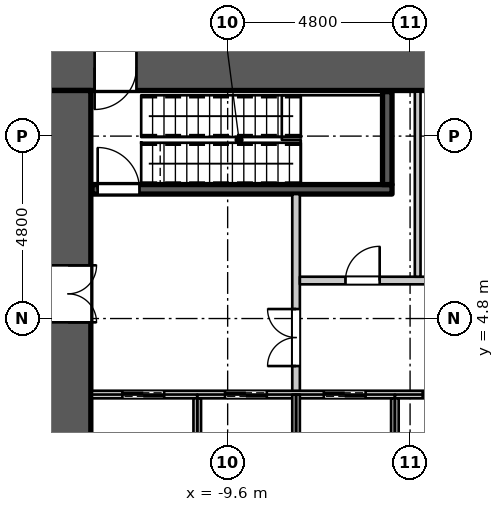
"""IFC4 building model, lengths in metres.
Left out: names, types, materials, properties, quantities, classifications, styles, units other than length and angle.
Written with IfcOpenShell. Run it as: python <this file> out.ifc"""

import sys

from ifc_helpers import new_model, si_unit, direction, frame, frame_2d, origin, place, context, subcontext, project, spatial, rectangle, extrude, element, fill, save


model = new_model("IFC4")
c1 = context("Model", 3, precision=1e-05, world=origin(), true_north=direction((0.0, 1.0)))
c2 = subcontext(c1, "Body", "Model", "MODEL_VIEW")
j1 = project(units=[si_unit("LENGTHUNIT", "METRE"), si_unit("PLANEANGLEUNIT", "RADIAN")], contexts=[c1])
p1 = place(None, origin())
s1 = spatial("IfcSite", under=j1, at=p1, CompositionType="ELEMENT")
p2 = place(p1, origin())
s2 = spatial("IfcBuilding", under=s1, at=p2, CompositionType="ELEMENT")
p3 = place(p2, frame((0.0, 0.0, 11.0)))
s3 = spatial("IfcBuildingStorey", under=s2, at=p3, CompositionType="ELEMENT", Elevation=11.0)
p4 = place(p3, frame((-14.4, 11.4, 0.0), z_axis=(0.0, 0.0, 1.0), x_axis=(1.0, 0.0, 0.0)))
e1 = element("IfcWall", 1, at=p4, inside=s3, PredefinedType="SHEAR", context=c2, shape_type="SweptSolid", body=[
    extrude(rectangle(XDim=28.8, YDim=1.2, at=frame_2d((14.4, 0.0))), origin(), (0.0, 0.0, 1.0), 5.0),
])
p5 = place(p4, frame((1.3, 0.0, 0.0)))
e2 = element("IfcOpeningElement", 2, at=p5, cuts=e1, PredefinedType="OPENING", context=c2, shape_type="SweptSolid", body=[
    extrude(rectangle(XDim=1.1, YDim=2.2, at=frame_2d((0.55, 1.1))), frame((0.0, 0.61, 0.0), z_axis=(0.0, -1.0, 0.0), x_axis=(1.0, 0.0, 0.0)), (0.0, 0.0, 1.0), 1.22),
])
p6 = place(p4, frame((26.4, 0.0, 0.0)))
e3 = element("IfcOpeningElement", 3, at=p6, cuts=e1, PredefinedType="OPENING", context=c2, shape_type="SweptSolid", body=[
    extrude(rectangle(XDim=1.1, YDim=2.2, at=frame_2d((0.55, 1.1))), frame((0.0, 0.61, 0.0), z_axis=(0.0, -1.0, 0.0), x_axis=(1.0, 0.0, 0.0)), (0.0, 0.0, 1.0), 1.22),
])
p7 = place(p3, frame((-13.8, -10.8, 0.0), z_axis=(0.0, 0.0, 1.0), x_axis=(0.0, 1.0, 0.0)))
e4 = element("IfcWall", 4, at=p7, inside=s3, PredefinedType="SHEAR", context=c2, shape_type="SweptSolid", body=[
    extrude(rectangle(XDim=21.6, YDim=1.2, at=frame_2d((10.8, 0.0))), origin(), (0.0, 0.0, 1.0), 5.0),
])
p8 = place(p7, frame((15.5, 0.0, 0.0)))
e5 = element("IfcOpeningElement", 5, at=p8, cuts=e4, PredefinedType="OPENING", context=c2, shape_type="SweptSolid", body=[
    extrude(rectangle(XDim=1.5, YDim=2.4, at=frame_2d((0.75, 1.2))), frame((0.0, 0.61, 0.0), z_axis=(0.0, -1.0, 0.0), x_axis=(1.0, 0.0, 0.0)), (0.0, 0.0, 1.0), 1.22),
])
p9 = place(p7, frame((4.5, 0.0, 0.0)))
e6 = element("IfcOpeningElement", 6, at=p9, cuts=e4, PredefinedType="OPENING", context=c2, shape_type="SweptSolid", body=[
    extrude(rectangle(XDim=1.5, YDim=2.4, at=frame_2d((0.75, 1.2))), frame((0.0, 0.61, 0.0), z_axis=(0.0, -1.0, 0.0), x_axis=(1.0, 0.0, 0.0)), (0.0, 0.0, 1.0), 1.22),
])
p10 = place(p3, frame((-7.8, 2.8, 0.0), z_axis=(0.0, 0.0, 1.0), x_axis=(0.0, 1.0, 0.0)))
e7 = element("IfcWall", 7, at=p10, inside=s3, PredefinedType="PARTITIONING", context=c2, shape_type="SweptSolid", body=[
    extrude(rectangle(XDim=5.275, YDim=0.2, at=frame_2d((2.637, 0.0))), origin(), (0.0, 0.0, 1.0), 4.65),
])
p11 = place(p10, frame((0.75, 0.0, 0.0)))
e8 = element("IfcOpeningElement", 8, at=p11, cuts=e7, PredefinedType="OPENING", context=c2, shape_type="SweptSolid", body=[
    extrude(rectangle(XDim=1.5, YDim=2.4, at=frame_2d((0.75, 1.2))), frame((0.0, 0.11, 0.0), z_axis=(0.0, -1.0, 0.0), x_axis=(1.0, 0.0, 0.0)), (0.0, 0.0, 1.0), 0.22),
])
p12 = place(p3, frame((-7.7, 5.8, 0.0), z_axis=(0.0, 0.0, 1.0), x_axis=(1.0, 0.0, 0.0)))
e9 = element("IfcWall", 9, at=p12, inside=s3, PredefinedType="PARTITIONING", context=c2, shape_type="SweptSolid", body=[
    extrude(rectangle(XDim=11.12, YDim=0.2, at=frame_2d((5.56, 0.0))), origin(), (0.0, 0.0, 1.0), 4.65),
])
p13 = place(p12, frame((1.2, 0.0, 0.0)))
e10 = element("IfcOpeningElement", 10, at=p13, cuts=e9, PredefinedType="OPENING", context=c2, shape_type="SweptSolid", body=[
    extrude(rectangle(XDim=0.9, YDim=2.2, at=frame_2d((0.45, 1.1))), frame((0.0, 0.11, 0.0), z_axis=(0.0, -1.0, 0.0), x_axis=(1.0, 0.0, 0.0)), (0.0, 0.0, 1.0), 0.22),
])
p14 = place(p12, frame((4.55, 0.0, 0.0)))
e11 = element("IfcOpeningElement", 11, at=p14, cuts=e9, PredefinedType="OPENING", context=c2, shape_type="SweptSolid", body=[
    extrude(rectangle(XDim=0.9, YDim=2.2, at=frame_2d((0.45, 1.1))), frame((0.0, 0.11, 0.0), z_axis=(0.0, -1.0, 0.0), x_axis=(1.0, 0.0, 0.0)), (0.0, 0.0, 1.0), 0.22),
])
p15 = place(p12, frame((8.5, 0.0, 0.0)))
e12 = element("IfcOpeningElement", 12, at=p15, cuts=e9, PredefinedType="OPENING", context=c2, shape_type="SweptSolid", body=[
    extrude(rectangle(XDim=0.9, YDim=2.2, at=frame_2d((0.45, 1.1))), frame((0.0, 0.11, 0.0), z_axis=(0.0, -1.0, 0.0), x_axis=(1.0, 0.0, 0.0)), (0.0, 0.0, 1.0), 0.22),
])
p16 = place(p3, frame((-4.6, 5.9, 0.0), z_axis=(0.0, 0.0, 1.0), x_axis=(0.0, 1.0, 0.0)))
e13 = element("IfcWall", 13, at=p16, inside=s3, PredefinedType="PARTITIONING", context=c2, shape_type="SweptSolid", body=[
    extrude(rectangle(XDim=4.87, YDim=0.15, at=frame_2d((2.435, 0.0))), origin(), (0.0, 0.0, 1.0), 4.65),
])
p17 = place(p3, frame((-13.17, 2.8, 0.0), z_axis=(0.0, 0.0, 1.0), x_axis=(1.0, 0.0, 0.0)))
e14 = element("IfcWall", 14, at=p17, inside=s3, PredefinedType="PARTITIONING", context=c2, shape_type="SweptSolid", body=[
    extrude(rectangle(XDim=23.57, YDim=0.2, at=frame_2d((11.785, 0.0))), origin(), (0.0, 0.0, 1.0), 4.65),
])
p18 = place(p17, frame((0.8, 0.0, 0.0)))
e15 = element("IfcOpeningElement", 15, at=p18, cuts=e14, PredefinedType="OPENING", context=c2, shape_type="SweptSolid", body=[
    extrude(rectangle(XDim=1.1, YDim=2.2, at=frame_2d((0.55, 1.1))), frame((0.0, 0.11, 0.0), z_axis=(0.0, -1.0, 0.0), x_axis=(1.0, 0.0, 0.0)), (0.0, 0.0, 1.0), 0.22),
])
p19 = place(p17, frame((3.5, 0.0, 0.0)))
e16 = element("IfcOpeningElement", 16, at=p19, cuts=e14, PredefinedType="OPENING", context=c2, shape_type="SweptSolid", body=[
    extrude(rectangle(XDim=1.1, YDim=2.2, at=frame_2d((0.55, 1.1))), frame((0.0, 0.11, 0.0), z_axis=(0.0, -1.0, 0.0), x_axis=(1.0, 0.0, 0.0)), (0.0, 0.0, 1.0), 0.22),
])
p20 = place(p17, frame((6.1, 0.0, 0.0)))
e17 = element("IfcOpeningElement", 17, at=p20, cuts=e14, PredefinedType="OPENING", context=c2, shape_type="SweptSolid", body=[
    extrude(rectangle(XDim=1.1, YDim=2.2, at=frame_2d((0.55, 1.1))), frame((0.0, 0.11, 0.0), z_axis=(0.0, -1.0, 0.0), x_axis=(1.0, 0.0, 0.0)), (0.0, 0.0, 1.0), 0.22),
])
p21 = place(p17, frame((8.7, 0.0, 0.0)))
e18 = element("IfcOpeningElement", 18, at=p21, cuts=e14, PredefinedType="OPENING", context=c2, shape_type="SweptSolid", body=[
    extrude(rectangle(XDim=1.1, YDim=2.2, at=frame_2d((0.55, 1.1))), frame((0.0, 0.11, 0.0), z_axis=(0.0, -1.0, 0.0), x_axis=(1.0, 0.0, 0.0)), (0.0, 0.0, 1.0), 0.22),
])
p22 = place(p17, frame((11.3, 0.0, 0.0)))
e19 = element("IfcOpeningElement", 19, at=p22, cuts=e14, PredefinedType="OPENING", context=c2, shape_type="SweptSolid", body=[
    extrude(rectangle(XDim=1.1, YDim=2.2, at=frame_2d((0.55, 1.1))), frame((0.0, 0.11, 0.0), z_axis=(0.0, -1.0, 0.0), x_axis=(1.0, 0.0, 0.0)), (0.0, 0.0, 1.0), 0.22),
])
p23 = place(p17, frame((13.9, 0.0, 0.0)))
e20 = element("IfcOpeningElement", 20, at=p23, cuts=e14, PredefinedType="OPENING", context=c2, shape_type="SweptSolid", body=[
    extrude(rectangle(XDim=1.1, YDim=2.2, at=frame_2d((0.55, 1.1))), frame((0.0, 0.11, 0.0), z_axis=(0.0, -1.0, 0.0), x_axis=(1.0, 0.0, 0.0)), (0.0, 0.0, 1.0), 0.22),
])
p24 = place(p17, frame((16.5, 0.0, 0.0)))
e21 = element("IfcOpeningElement", 21, at=p24, cuts=e14, PredefinedType="OPENING", context=c2, shape_type="SweptSolid", body=[
    extrude(rectangle(XDim=1.1, YDim=2.2, at=frame_2d((0.55, 1.1))), frame((0.0, 0.11, 0.0), z_axis=(0.0, -1.0, 0.0), x_axis=(1.0, 0.0, 0.0)), (0.0, 0.0, 1.0), 0.22),
])
p25 = place(p17, frame((19.1, 0.0, 0.0)))
e22 = element("IfcOpeningElement", 22, at=p25, cuts=e14, PredefinedType="OPENING", context=c2, shape_type="SweptSolid", body=[
    extrude(rectangle(XDim=1.1, YDim=2.2, at=frame_2d((0.55, 1.1))), frame((0.0, 0.11, 0.0), z_axis=(0.0, -1.0, 0.0), x_axis=(1.0, 0.0, 0.0)), (0.0, 0.0, 1.0), 0.22),
])
p26 = place(p3, frame((-10.4, 0.0, 0.0), z_axis=(0.0, 0.0, 1.0), x_axis=(0.0, 1.0, 0.0)))
e23 = element("IfcWall", 23, at=p26, inside=s3, PredefinedType="PARTITIONING", context=c2, shape_type="SweptSolid", body=[
    extrude(rectangle(XDim=2.7, YDim=0.2, at=frame_2d((1.35, 0.0))), origin(), (0.0, 0.0, 1.0), 4.65),
])
p27 = place(p3, frame((-7.8, 0.0, 0.0), z_axis=(0.0, 0.0, 1.0), x_axis=(0.0, 1.0, 0.0)))
e24 = element("IfcWall", 24, at=p27, inside=s3, PredefinedType="PARTITIONING", context=c2, shape_type="SweptSolid", body=[
    extrude(rectangle(XDim=2.8, YDim=0.2, at=frame_2d((1.4, 0.0))), origin(), (0.0, 0.0, 1.0), 4.65),
])
p28 = place(p3, frame((-5.2, 0.1, 0.0), z_axis=(0.0, 0.0, 1.0), x_axis=(0.0, 1.0, 0.0)))
e25 = element("IfcWall", 25, at=p28, inside=s3, PredefinedType="PARTITIONING", context=c2, shape_type="SweptSolid", body=[
    extrude(rectangle(XDim=2.6, YDim=0.2, at=frame_2d((1.3, 0.0))), origin(), (0.0, 0.0, 1.0), 4.65),
])
p29 = place(p3, frame((-13.17, 8.2, 0.0), z_axis=(0.0, 0.0, 1.0), x_axis=(1.0, 0.0, 0.0)))
e26 = element("IfcWall", 26, at=p29, inside=s3, PredefinedType="SHEAR", context=c2, shape_type="SweptSolid", body=[
    extrude(rectangle(XDim=7.895, YDim=0.25, at=frame_2d((3.948, 0.0))), origin(), (0.0, 0.0, 1.0), 4.65),
])
p30 = place(p29, frame((0.15, 0.0, 0.0)))
e27 = element("IfcOpeningElement", 27, at=p30, cuts=e26, PredefinedType="OPENING", context=c2, shape_type="SweptSolid", body=[
    extrude(rectangle(XDim=1.1, YDim=2.2, at=frame_2d((0.55, 1.1))), frame((0.0, 0.135, 0.0), z_axis=(0.0, -1.0, 0.0), x_axis=(1.0, 0.0, 0.0)), (0.0, 0.0, 1.0), 0.27),
])
p31 = place(p3, frame((-5.4, 8.325, 0.0), z_axis=(0.0, 0.0, 1.0), x_axis=(0.0, 1.0, 0.0)))
e28 = element("IfcWall", 28, at=p31, inside=s3, PredefinedType="SHEAR", context=c2, shape_type="SweptSolid", body=[
    extrude(rectangle(XDim=2.445, YDim=0.25, at=frame_2d((1.223, 0.0))), origin(), (0.0, 0.0, 1.0), 4.65),
])
p32 = place(p13, origin())
e29 = element("IfcDoor", 29, at=p32, inside=s3, OperationType="SINGLE_SWING_RIGHT", PredefinedType="DOOR", context=c2, shape_type="SweptSolid", body=[
    extrude(rectangle(XDim=0.9, YDim=2.2, at=frame_2d((0.45, 1.1))), frame((0.0, 0.025, 0.0), z_axis=(0.0, -1.0, 0.0), x_axis=(1.0, 0.0, 0.0)), (0.0, 0.0, 1.0), 0.05),
])
fill(e10, e29)
p33 = place(p18, origin())
e30 = element("IfcDoor", 30, at=p33, inside=s3, OperationType="DOUBLE_DOOR_SLIDING", PredefinedType="DOOR", context=c2, shape_type="SweptSolid", body=[
    extrude(rectangle(XDim=1.1, YDim=2.2, at=frame_2d((0.55, 1.1))), frame((0.0, 0.025, 0.0), z_axis=(0.0, -1.0, 0.0), x_axis=(1.0, 0.0, 0.0)), (0.0, 0.0, 1.0), 0.05),
])
fill(e15, e30)
p34 = place(p19, origin())
e31 = element("IfcDoor", 31, at=p34, inside=s3, OperationType="DOUBLE_DOOR_SLIDING", PredefinedType="DOOR", context=c2, shape_type="SweptSolid", body=[
    extrude(rectangle(XDim=1.1, YDim=2.2, at=frame_2d((0.55, 1.1))), frame((0.0, 0.025, 0.0), z_axis=(0.0, -1.0, 0.0), x_axis=(1.0, 0.0, 0.0)), (0.0, 0.0, 1.0), 0.05),
])
fill(e16, e31)
p35 = place(p20, origin())
e32 = element("IfcDoor", 32, at=p35, inside=s3, OperationType="DOUBLE_DOOR_SLIDING", PredefinedType="DOOR", context=c2, shape_type="SweptSolid", body=[
    extrude(rectangle(XDim=1.1, YDim=2.2, at=frame_2d((0.55, 1.1))), frame((0.0, 0.025, 0.0), z_axis=(0.0, -1.0, 0.0), x_axis=(1.0, 0.0, 0.0)), (0.0, 0.0, 1.0), 0.05),
])
fill(e17, e32)
p36 = place(p21, origin())
e33 = element("IfcDoor", 33, at=p36, inside=s3, OperationType="DOUBLE_DOOR_SLIDING", PredefinedType="DOOR", context=c2, shape_type="SweptSolid", body=[
    extrude(rectangle(XDim=1.1, YDim=2.2, at=frame_2d((0.55, 1.1))), frame((0.0, 0.025, 0.0), z_axis=(0.0, -1.0, 0.0), x_axis=(1.0, 0.0, 0.0)), (0.0, 0.0, 1.0), 0.05),
])
fill(e18, e33)
p37 = place(p30, origin())
e34 = element("IfcDoor", 34, at=p37, inside=s3, OperationType="SINGLE_SWING_LEFT", PredefinedType="DOOR", context=c2, shape_type="SweptSolid", body=[
    extrude(rectangle(XDim=1.1, YDim=2.2, at=frame_2d((0.55, 1.1))), frame((0.0, 0.025, 0.0), z_axis=(0.0, -1.0, 0.0), x_axis=(1.0, 0.0, 0.0)), (0.0, 0.0, 1.0), 0.05),
])
fill(e27, e34)
p38 = place(p11, origin())
e35 = element("IfcDoor", 35, at=p38, inside=s3, OperationType="DOUBLE_DOOR_SINGLE_SWING", PredefinedType="DOOR", context=c2, shape_type="SweptSolid", body=[
    extrude(rectangle(XDim=1.5, YDim=2.4, at=frame_2d((0.75, 1.2))), frame((0.0, 0.025, 0.0), z_axis=(0.0, -1.0, 0.0), x_axis=(1.0, 0.0, 0.0)), (0.0, 0.0, 1.0), 0.05),
])
fill(e8, e35)
p39 = place(p8, origin())
e36 = element("IfcDoor", 36, at=p39, inside=s3, OperationType="DOUBLE_DOOR_SINGLE_SWING", PredefinedType="DOOR", context=c2, shape_type="SweptSolid", body=[
    extrude(rectangle(XDim=1.5, YDim=2.4, at=frame_2d((0.75, 1.2))), frame((0.0, 0.025, 0.0), z_axis=(0.0, -1.0, 0.0), x_axis=(1.0, 0.0, 0.0)), (0.0, 0.0, 1.0), 0.05),
])
fill(e5, e36)
p40 = place(p5, origin())
e37 = element("IfcDoor", 37, at=p40, inside=s3, OperationType="SINGLE_SWING_RIGHT", PredefinedType="DOOR", context=c2, shape_type="SweptSolid", body=[
    extrude(rectangle(XDim=1.1, YDim=2.2, at=frame_2d((0.55, 1.1))), frame((0.0, 0.025, 0.0), z_axis=(0.0, -1.0, 0.0), x_axis=(1.0, 0.0, 0.0)), (0.0, 0.0, 1.0), 0.05),
])
fill(e2, e37)
save(model, sys.argv[1])
